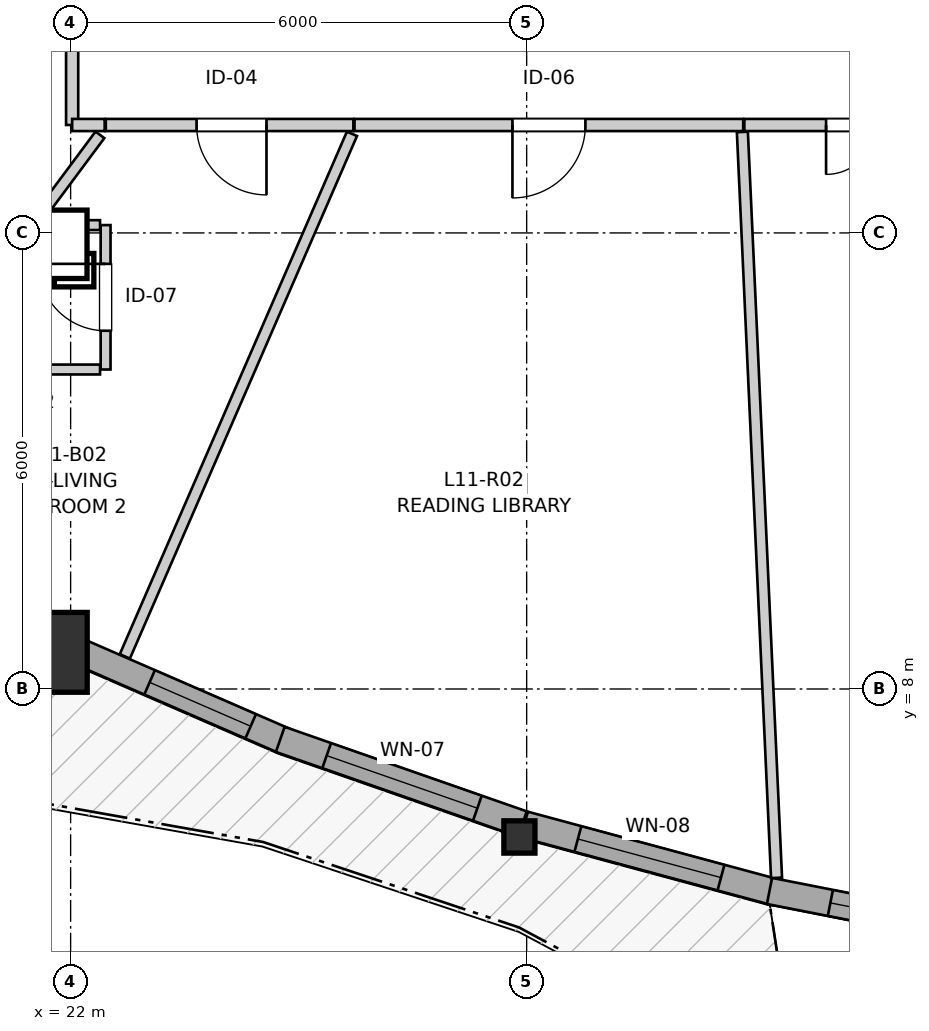
"""IFC4 building model, lengths in metres.
Left out: names, types, materials, properties, quantities, classifications, styles, units other than length and angle.
Written with IfcOpenShell. Run it as: python <this file> out.ifc"""

import sys

from ifc_helpers import new_model, si_unit, direction, frame, frame_2d, origin, origin_2d, place, context, subcontext, project, spatial, rectangle, i_section, extrude, source, transform, mapped, element, fill, save


model = new_model("IFC4")
c1 = context("Model", 3, precision=1e-05, world=origin(), true_north=direction((0.0, 1.0)))
c2 = subcontext(c1, "Body", "Model", "MODEL_VIEW")
j1 = project(units=[si_unit("LENGTHUNIT", "METRE"), si_unit("PLANEANGLEUNIT", "RADIAN")], contexts=[c1])
p1 = place(None, origin())
s1 = spatial("IfcSite", under=j1, at=p1, CompositionType="ELEMENT")
p2 = place(p1, origin())
s2 = spatial("IfcBuilding", under=s1, at=p2, CompositionType="ELEMENT")
p3 = place(p2, frame((0.0, 0.0, 39.8)))
s3 = spatial("IfcBuildingStorey", under=s2, at=p3, CompositionType="ELEMENT", Elevation=39.8)
m1 = source(origin(), c2, "Body", "SweptSolid", [
    extrude(rectangle(XDim=1.05, YDim=1.05, at=origin_2d()), origin(), (0.0, 0.0, 1.0), 2.94),
])
p4 = place(p3, frame((21.693, 8.482, 0.0), z_axis=(0.0, 0.0, 1.0), x_axis=(1.0, 0.0, 0.0)))
e1 = element("IfcColumn", 1, at=p4, inside=s3, PredefinedType="COLUMN", context=c2, shape_type="MappedRepresentation", body=[
    mapped(m1, transform((0.0, 0.0, 0.0), x_axis=(1.0, 0.0, 0.0), y_axis=(0.0, 1.0, 0.0), z_axis=(0.0, 0.0, 1.0), scale=1.0)),
])
m2 = source(origin(), c2, "Body", "SweptSolid", [
    extrude(i_section(OverallWidth=0.409, OverallDepth=0.425, WebThickness=0.03, FlangeThickness=0.048, FilletRadius=0.015, at=origin_2d()), origin(), (0.0, 0.0, 1.0), 2.94),
])
p5 = place(p3, frame((27.905, 6.053, 0.0), z_axis=(0.0, 0.0, 1.0), x_axis=(1.0, 0.0, 0.0)))
e2 = element("IfcColumn", 2, at=p5, inside=s3, PredefinedType="PILASTER", context=c2, shape_type="MappedRepresentation", body=[
    mapped(m2, transform((0.0, 0.0, 0.0), x_axis=(1.0, 0.0, 0.0), y_axis=(0.0, 1.0, 0.0), z_axis=(0.0, 0.0, 1.0), scale=1.0)),
])
p6 = place(p3, frame((22.038, 8.523, 0.0), z_axis=(0.0, 0.0, 1.0), x_axis=(0.91704973522, -0.398772846535, 0.0)))
e3 = element("IfcWall", 3, at=p6, inside=s3, PredefinedType="SOLIDWALL", context=c2, shape_type="SweptSolid", body=[
    extrude(rectangle(XDim=3.056, YDim=0.35, at=frame_2d((1.528, 0.0))), origin(), (0.0, 0.0, 1.0), 2.42),
])
p7 = place(p6, frame((1.092, 0.0, 0.82)))
e4 = element("IfcOpeningElement", 4, at=p7, cuts=e3, PredefinedType="OPENING", context=c2, shape_type="SweptSolid", body=[
    extrude(rectangle(XDim=1.45, YDim=1.25, at=frame_2d((0.725, 0.625))), frame((0.0, 0.185, 0.0), z_axis=(0.0, -1.0, 0.0), x_axis=(1.0, 0.0, 0.0)), (0.0, 0.0, 1.0), 0.37),
])
p8 = place(p3, frame((24.758, 7.337, 0.0), z_axis=(0.0, 0.0, 1.0), x_axis=(0.944146789085, -0.329525174547, 0.0)))
e5 = element("IfcWall", 5, at=p8, inside=s3, PredefinedType="SOLIDWALL", context=c2, shape_type="SweptSolid", body=[
    extrude(rectangle(XDim=3.374, YDim=0.35, at=frame_2d((1.687, 0.0))), origin(), (0.0, 0.0, 1.0), 2.42),
])
p9 = place(p8, frame((0.647, 0.0, 0.82)))
e6 = element("IfcOpeningElement", 6, at=p9, cuts=e5, PredefinedType="OPENING", context=c2, shape_type="SweptSolid", body=[
    extrude(rectangle(XDim=2.1, YDim=1.4, at=frame_2d((1.05, 0.7))), frame((0.0, 0.185, 0.0), z_axis=(0.0, -1.0, 0.0), x_axis=(1.0, 0.0, 0.0)), (0.0, 0.0, 1.0), 0.37),
])
p10 = place(p3, frame((27.969, 6.217, 0.0), z_axis=(0.0, 0.0, 1.0), x_axis=(0.965465079887, -0.26053249225, 0.0)))
e7 = element("IfcWall", 7, at=p10, inside=s3, PredefinedType="SOLIDWALL", context=c2, shape_type="SweptSolid", body=[
    extrude(rectangle(XDim=3.43, YDim=0.35, at=frame_2d((1.715, 0.0))), origin(), (0.0, 0.0, 1.0), 2.42),
])
p11 = place(p10, frame((0.73, 0.0, 0.82)))
e8 = element("IfcOpeningElement", 8, at=p11, cuts=e7, PredefinedType="OPENING", context=c2, shape_type="SweptSolid", body=[
    extrude(rectangle(XDim=1.95, YDim=1.4, at=frame_2d((0.975, 0.7))), frame((0.0, 0.185, 0.0), z_axis=(0.0, -1.0, 0.0), x_axis=(1.0, 0.0, 0.0)), (0.0, 0.0, 1.0), 0.37),
])
p12 = place(p3, frame((31.195, 5.343, 0.0), z_axis=(0.0, 0.0, 1.0), x_axis=(0.981233720322, -0.192822161858, 0.0)))
e9 = element("IfcWall", 9, at=p12, inside=s3, PredefinedType="SOLIDWALL", context=c2, shape_type="SweptSolid", body=[
    extrude(rectangle(XDim=3.222, YDim=0.35, at=frame_2d((1.611, 0.0))), origin(), (0.0, 0.0, 1.0), 2.42),
])
p13 = place(p12, frame((0.816, 0.0, 0.82)))
e10 = element("IfcOpeningElement", 10, at=p13, cuts=e9, PredefinedType="OPENING", context=c2, shape_type="SweptSolid", body=[
    extrude(rectangle(XDim=1.6, YDim=1.35, at=frame_2d((0.8, 0.675))), frame((0.0, 0.185, 0.0), z_axis=(0.0, -1.0, 0.0), x_axis=(1.0, 0.0, 0.0)), (0.0, 0.0, 1.0), 0.37),
])
p14 = place(p3, frame((30.849, 15.42, 0.0), z_axis=(0.0, 0.0, 1.0), x_axis=(-1.0, 0.0, 0.0)))
e11 = element("IfcWall", 11, at=p14, inside=s3, PredefinedType="PARTITIONING", context=c2, shape_type="SweptSolid", body=[
    extrude(rectangle(XDim=5.114, YDim=0.16, at=frame_2d((2.557, 0.0))), origin(), (0.0, 0.0, 1.0), 2.94),
])
p15 = place(p14, frame((2.076, 0.0, 0.0)))
e12 = element("IfcOpeningElement", 12, at=p15, cuts=e11, PredefinedType="OPENING", context=c2, shape_type="SweptSolid", body=[
    extrude(rectangle(XDim=0.96, YDim=2.1, at=frame_2d((0.48, 1.05))), frame((0.0, 0.09, 0.0), z_axis=(0.0, -1.0, 0.0), x_axis=(1.0, 0.0, 0.0)), (0.0, 0.0, 1.0), 0.18),
])
p16 = place(p3, frame((34.361, 15.42, 0.0), z_axis=(0.0, 0.0, 1.0), x_axis=(-1.0, 0.0, 0.0)))
e13 = element("IfcWall", 13, at=p16, inside=s3, PredefinedType="PARTITIONING", context=c2, shape_type="SweptSolid", body=[
    extrude(rectangle(XDim=3.497, YDim=0.16, at=frame_2d((1.749, 0.0))), origin(), (0.0, 0.0, 1.0), 2.94),
])
p17 = place(p16, frame((1.122, 0.0, 0.0)))
e14 = element("IfcOpeningElement", 14, at=p17, cuts=e13, PredefinedType="OPENING", context=c2, shape_type="SweptSolid", body=[
    extrude(rectangle(XDim=1.3, YDim=2.1, at=frame_2d((0.65, 1.05))), frame((0.0, 0.09, 0.0), z_axis=(0.0, -1.0, 0.0), x_axis=(1.0, 0.0, 0.0)), (0.0, 0.0, 1.0), 0.18),
])
p18 = place(p3, frame((22.02, 15.42, 0.0), z_axis=(0.0, 0.0, 1.0), x_axis=(0.0, 1.0, 0.0)))
e15 = element("IfcWall", 15, at=p18, inside=s3, PredefinedType="PARTITIONING", context=c2, shape_type="SweptSolid", body=[
    extrude(rectangle(XDim=3.287, YDim=0.16, at=frame_2d((1.644, 0.0))), origin(), (0.0, 0.0, 1.0), 2.94),
])
p19 = place(p18, frame((1.201, 0.0, 0.0)))
e16 = element("IfcOpeningElement", 16, at=p19, cuts=e15, PredefinedType="OPENING", context=c2, shape_type="SweptSolid", body=[
    extrude(rectangle(XDim=0.92, YDim=2.1, at=frame_2d((0.46, 1.05))), frame((0.0, 0.09, 0.0), z_axis=(0.0, -1.0, 0.0), x_axis=(1.0, 0.0, 0.0)), (0.0, 0.0, 1.0), 0.18),
])
p20 = place(p3, frame((25.72, 15.42, 0.0), z_axis=(0.0, 0.0, 1.0), x_axis=(-1.0, 0.0, 0.0)))
e17 = element("IfcWall", 17, at=p20, inside=s3, PredefinedType="PARTITIONING", context=c2, shape_type="SweptSolid", body=[
    extrude(rectangle(XDim=3.257, YDim=0.16, at=frame_2d((1.628, 0.0))), origin(), (0.0, 0.0, 1.0), 2.94),
])
p21 = place(p20, frame((1.143, 0.0, 0.0)))
e18 = element("IfcOpeningElement", 18, at=p21, cuts=e17, PredefinedType="OPENING", context=c2, shape_type="SweptSolid", body=[
    extrude(rectangle(XDim=0.92, YDim=2.1, at=frame_2d((0.46, 1.05))), frame((0.0, 0.09, 0.0), z_axis=(0.0, -1.0, 0.0), x_axis=(1.0, 0.0, 0.0)), (0.0, 0.0, 1.0), 0.18),
])
p22 = place(p3, frame((22.46, 12.203, 0.0), z_axis=(0.0, 0.0, 1.0), x_axis=(0.0, 1.0, 0.0)))
e19 = element("IfcWall", 19, at=p22, inside=s3, PredefinedType="PARTITIONING", context=c2, shape_type="SweptSolid", body=[
    extrude(rectangle(XDim=1.9, YDim=0.13, at=frame_2d((0.95, 0.0))), origin(), (0.0, 0.0, 1.0), 2.94),
])
p23 = place(p22, frame((0.51, 0.0, 0.0)))
e20 = element("IfcOpeningElement", 20, at=p23, cuts=e19, PredefinedType="OPENING", context=c2, shape_type="SweptSolid", body=[
    extrude(rectangle(XDim=0.88, YDim=2.05, at=frame_2d((0.44, 1.025))), frame((0.0, 0.075, 0.0), z_axis=(0.0, -1.0, 0.0), x_axis=(1.0, 0.0, 0.0)), (0.0, 0.0, 1.0), 0.15),
])
p24 = place(p3, frame((30.838, 15.329, 0.0), z_axis=(0.0, 0.0, 1.0), x_axis=(0.045777414824, -0.998951664642, 0.0)))
e21 = element("IfcWall", 21, at=p24, inside=s3, PredefinedType="PARTITIONING", context=c2, shape_type="SweptSolid", body=[
    extrude(rectangle(XDim=9.824, YDim=0.145, at=frame_2d((4.912, 0.0))), origin(), (0.0, 0.0, 1.0), 2.94),
])
p25 = place(p3, frame((22.713, 8.429, 0.0), z_axis=(0.0, 0.0, 1.0), x_axis=(0.398615352261, 0.917118204454, 0.0)))
e22 = element("IfcWall", 22, at=p25, inside=s3, PredefinedType="PARTITIONING", context=c2, shape_type="SweptSolid", body=[
    extrude(rectangle(XDim=7.496, YDim=0.145, at=frame_2d((3.748, 0.0))), origin(), (0.0, 0.0, 1.0), 2.94),
])
p26 = place(p3, frame((18.614, 15.774, 0.0), z_axis=(0.0, 0.0, 1.0), x_axis=(0.753902736672, 0.656986045239, 0.0)))
e23 = element("IfcWall", 23, at=p26, inside=s3, PredefinedType="PARTITIONING", context=c2, shape_type="SweptSolid", body=[
    extrude(rectangle(XDim=4.34, YDim=0.145, at=frame_2d((2.17, 0.0))), origin(), (0.0, 0.0, 1.0), 2.94),
])
p27 = place(p3, frame((20.66, 12.203, 0.0), z_axis=(0.0, 0.0, 1.0), x_axis=(1.0, 0.0, 0.0)))
e24 = element("IfcWall", 24, at=p27, inside=s3, PredefinedType="PARTITIONING", context=c2, shape_type="SweptSolid", body=[
    extrude(rectangle(XDim=1.727, YDim=0.13, at=frame_2d((0.864, 0.0))), origin(), (0.0, 0.0, 1.0), 2.94),
])
p28 = place(p3, frame((21.491, 14.088, 0.0), z_axis=(0.0, 0.0, 1.0), x_axis=(0.596893728005, 0.802320308523, 0.0)))
e25 = element("IfcWall", 25, at=p28, inside=s3, PredefinedType="PARTITIONING", context=c2, shape_type="SweptSolid", body=[
    extrude(rectangle(XDim=1.499, YDim=0.145, at=frame_2d((0.749, 0.0))), origin(), (0.0, 0.0, 1.0), 2.94),
])
p29 = place(p3, frame((21.649, 14.103, 0.0), z_axis=(0.0, 0.0, 1.0), x_axis=(1.0, 0.0, 0.0)))
e26 = element("IfcWall", 26, at=p29, inside=s3, PredefinedType="PARTITIONING", context=c2, shape_type="SweptSolid", body=[
    extrude(rectangle(XDim=0.738, YDim=0.13, at=frame_2d((0.369, 0.0))), origin(), (0.0, 0.0, 1.0), 2.94),
])
p30 = place(p3, frame((22.02, 15.42, 0.0), z_axis=(0.0, 0.0, 1.0), x_axis=(1.0, 0.0, 0.0)))
e27 = element("IfcWall", 27, at=p30, inside=s3, PredefinedType="PARTITIONING", context=c2, shape_type="SweptSolid", body=[
    extrude(rectangle(XDim=0.428, YDim=0.16, at=frame_2d((0.214, 0.0))), origin(), (0.0, 0.0, 1.0), 2.94),
])
m3 = source(origin(), c2, "Body", "SweptSolid", [
    extrude(rectangle(XDim=1.45, YDim=1.25, at=frame_2d((0.725, 0.625))), frame((0.0, 0.03, 0.0), z_axis=(0.0, -1.0, 0.0), x_axis=(1.0, 0.0, 0.0)), (0.0, 0.0, 1.0), 0.06),
])
p31 = place(p7, origin())
e28 = element("IfcWindow", 28, at=p31, inside=s3, PartitioningType="SINGLE_PANEL", PredefinedType="WINDOW", context=c2, shape_type="MappedRepresentation", body=[
    mapped(m3, transform((0.0, 0.0, 0.0), x_axis=(1.0, 0.0, 0.0), y_axis=(0.0, 1.0, 0.0), z_axis=(0.0, 0.0, 1.0), scale=1.0)),
])
fill(e4, e28)
m4 = source(origin(), c2, "Body", "SweptSolid", [
    extrude(rectangle(XDim=2.1, YDim=1.4, at=frame_2d((1.05, 0.7))), frame((0.0, 0.03, 0.0), z_axis=(0.0, -1.0, 0.0), x_axis=(1.0, 0.0, 0.0)), (0.0, 0.0, 1.0), 0.06),
])
p32 = place(p9, origin())
e29 = element("IfcWindow", 29, at=p32, inside=s3, PartitioningType="SINGLE_PANEL", PredefinedType="WINDOW", context=c2, shape_type="MappedRepresentation", body=[
    mapped(m4, transform((0.0, 0.0, 0.0), x_axis=(1.0, 0.0, 0.0), y_axis=(0.0, 1.0, 0.0), z_axis=(0.0, 0.0, 1.0), scale=1.0)),
])
fill(e6, e29)
m5 = source(origin(), c2, "Body", "SweptSolid", [
    extrude(rectangle(XDim=1.95, YDim=1.4, at=frame_2d((0.975, 0.7))), frame((0.0, 0.03, 0.0), z_axis=(0.0, -1.0, 0.0), x_axis=(1.0, 0.0, 0.0)), (0.0, 0.0, 1.0), 0.06),
])
p33 = place(p11, origin())
e30 = element("IfcWindow", 30, at=p33, inside=s3, PartitioningType="SINGLE_PANEL", PredefinedType="WINDOW", context=c2, shape_type="MappedRepresentation", body=[
    mapped(m5, transform((0.0, 0.0, 0.0), x_axis=(1.0, 0.0, 0.0), y_axis=(0.0, 1.0, 0.0), z_axis=(0.0, 0.0, 1.0), scale=1.0)),
])
fill(e8, e30)
m6 = source(origin(), c2, "Body", "SweptSolid", [
    extrude(rectangle(XDim=1.6, YDim=1.35, at=frame_2d((0.8, 0.675))), frame((0.0, 0.03, 0.0), z_axis=(0.0, -1.0, 0.0), x_axis=(1.0, 0.0, 0.0)), (0.0, 0.0, 1.0), 0.06),
])
p34 = place(p13, origin())
e31 = element("IfcWindow", 31, at=p34, inside=s3, PartitioningType="SINGLE_PANEL", PredefinedType="WINDOW", context=c2, shape_type="MappedRepresentation", body=[
    mapped(m6, transform((0.0, 0.0, 0.0), x_axis=(1.0, 0.0, 0.0), y_axis=(0.0, 1.0, 0.0), z_axis=(0.0, 0.0, 1.0), scale=1.0)),
])
fill(e10, e31)
m7 = source(origin(), c2, "Body", "SweptSolid", [
    extrude(rectangle(XDim=0.96, YDim=2.1, at=frame_2d((0.48, 1.05))), frame((0.0, 0.025, 0.0), z_axis=(0.0, -1.0, 0.0), x_axis=(1.0, 0.0, 0.0)), (0.0, 0.0, 1.0), 0.05),
])
p35 = place(p15, origin())
e32 = element("IfcDoor", 32, at=p35, inside=s3, OperationType="SINGLE_SWING_RIGHT", PredefinedType="DOOR", context=c2, shape_type="MappedRepresentation", body=[
    mapped(m7, transform((0.0, 0.0, 0.0), x_axis=(1.0, 0.0, 0.0), y_axis=(0.0, 1.0, 0.0), z_axis=(0.0, 0.0, 1.0), scale=1.0)),
])
fill(e12, e32)
m8 = source(origin(), c2, "Body", "SweptSolid", [
    extrude(rectangle(XDim=1.3, YDim=2.1, at=frame_2d((0.65, 1.05))), frame((0.0, 0.025, 0.0), z_axis=(0.0, -1.0, 0.0), x_axis=(1.0, 0.0, 0.0)), (0.0, 0.0, 1.0), 0.05),
])
p36 = place(p17, origin())
e33 = element("IfcDoor", 33, at=p36, inside=s3, OperationType="DOUBLE_DOOR_SINGLE_SWING", PredefinedType="DOOR", context=c2, shape_type="MappedRepresentation", body=[
    mapped(m8, transform((0.0, 0.0, 0.0), x_axis=(1.0, 0.0, 0.0), y_axis=(0.0, 1.0, 0.0), z_axis=(0.0, 0.0, 1.0), scale=1.0)),
])
fill(e14, e33)
m9 = source(origin(), c2, "Body", "SweptSolid", [
    extrude(rectangle(XDim=0.92, YDim=2.1, at=frame_2d((0.46, 1.05))), frame((0.0, 0.025, 0.0), z_axis=(0.0, -1.0, 0.0), x_axis=(1.0, 0.0, 0.0)), (0.0, 0.0, 1.0), 0.05),
])
p37 = place(p21, origin())
e34 = element("IfcDoor", 34, at=p37, inside=s3, OperationType="SINGLE_SWING_LEFT", PredefinedType="DOOR", context=c2, shape_type="MappedRepresentation", body=[
    mapped(m9, transform((0.0, 0.0, 0.0), x_axis=(1.0, 0.0, 0.0), y_axis=(0.0, 1.0, 0.0), z_axis=(0.0, 0.0, 1.0), scale=1.0)),
])
fill(e18, e34)
m10 = source(origin(), c2, "Body", "SweptSolid", [
    extrude(rectangle(XDim=0.88, YDim=2.05, at=frame_2d((0.44, 1.025))), frame((0.0, 0.025, 0.0), z_axis=(0.0, -1.0, 0.0), x_axis=(1.0, 0.0, 0.0)), (0.0, 0.0, 1.0), 0.05),
])
p38 = place(p23, origin())
e35 = element("IfcDoor", 35, at=p38, inside=s3, OperationType="SINGLE_SWING_RIGHT", PredefinedType="DOOR", context=c2, shape_type="MappedRepresentation", body=[
    mapped(m10, transform((0.0, 0.0, 0.0), x_axis=(1.0, 0.0, 0.0), y_axis=(0.0, 1.0, 0.0), z_axis=(0.0, 0.0, 1.0), scale=1.0)),
])
fill(e20, e35)
save(model, sys.argv[1])
